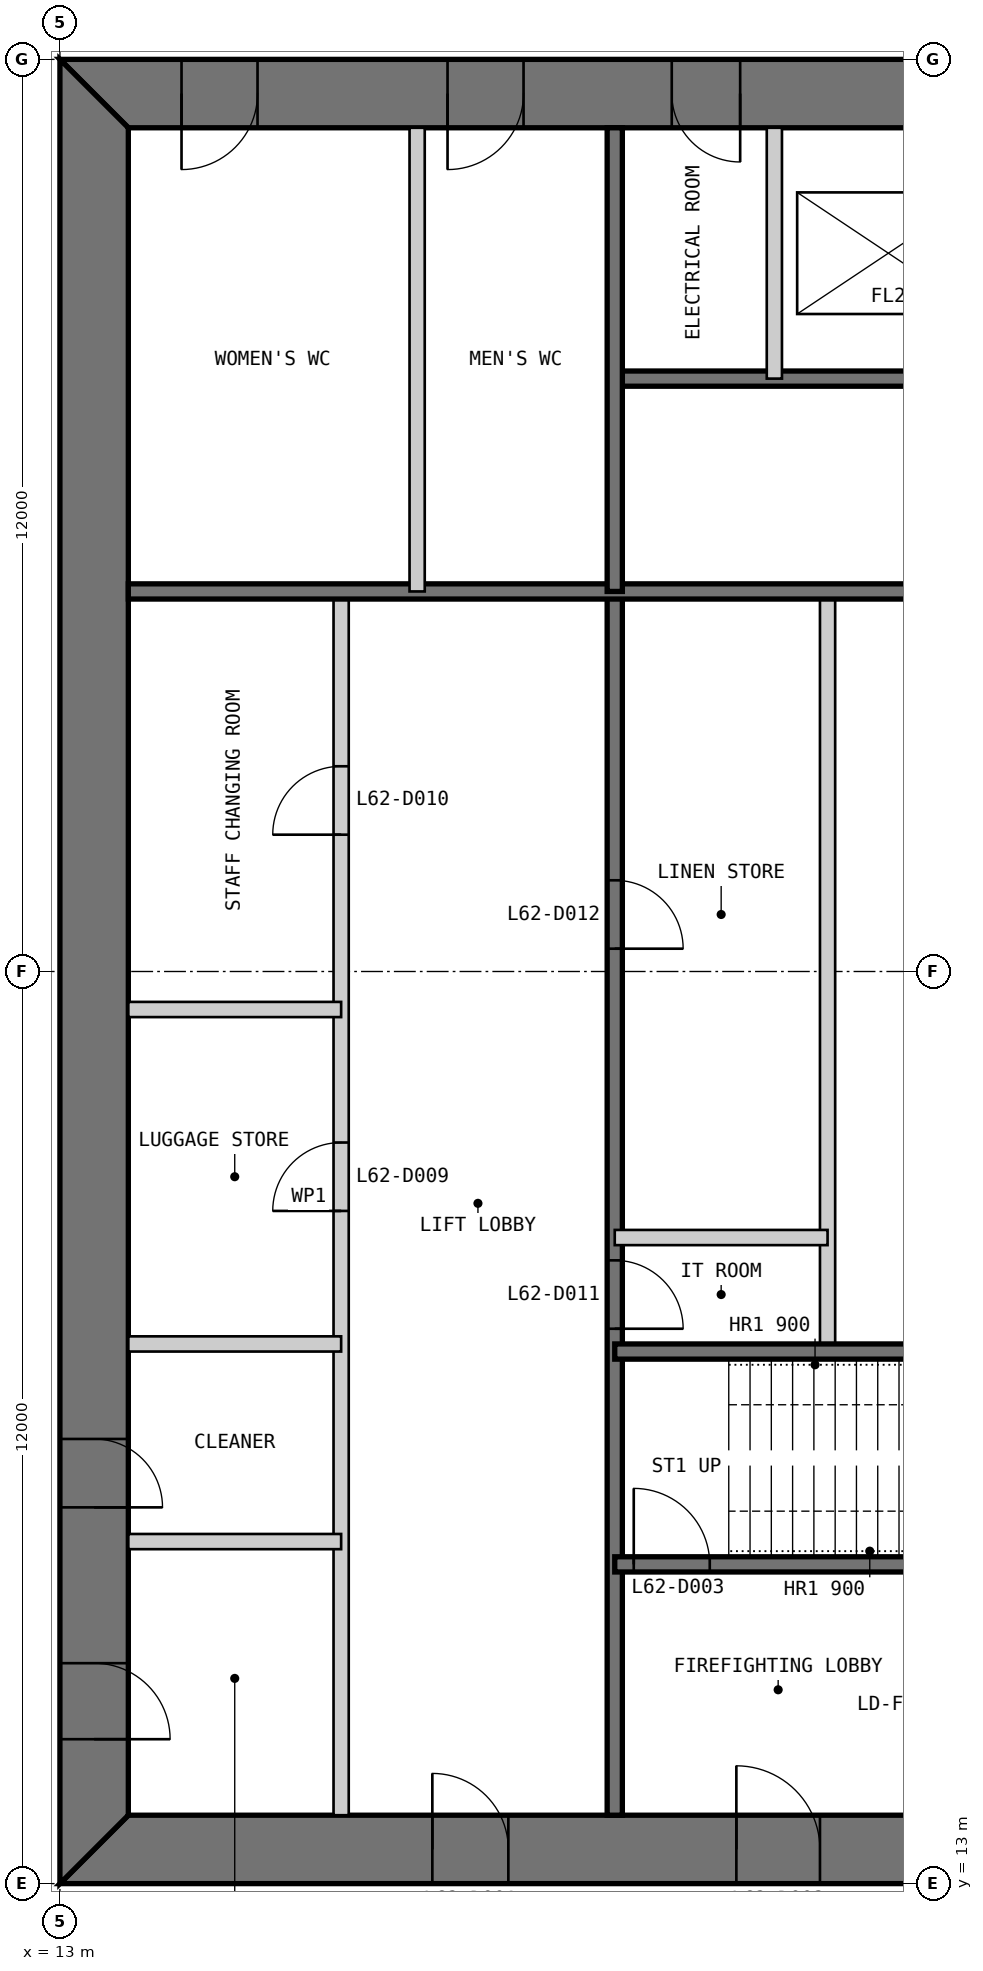
"""IFC4 building model, lengths in metres.
Left out: names, types, materials, properties, quantities, classifications, styles, units other than length and angle.
Written with IfcOpenShell. Run it as: python <this file> out.ifc"""

import sys

from ifc_helpers import new_model, si_unit, direction, frame, frame_2d, origin, place, context, subcontext, project, spatial, polyline, rectangle, outline, extrude, element, fill, save


model = new_model("IFC4")
c1 = context("Model", 3, precision=1e-05, world=origin(), true_north=direction((0.0, 1.0)))
c2 = subcontext(c1, "Body", "Model", "MODEL_VIEW")
j1 = project(units=[si_unit("LENGTHUNIT", "METRE"), si_unit("PLANEANGLEUNIT", "RADIAN")], contexts=[c1])
p1 = place(None, origin())
s1 = spatial("IfcSite", under=j1, at=p1, CompositionType="ELEMENT")
p2 = place(p1, origin())
s2 = spatial("IfcBuilding", under=s1, at=p2, CompositionType="ELEMENT")
p3 = place(p2, frame((0.0, 0.0, 262.8)))
s3 = spatial("IfcBuildingStorey", under=s2, at=p3, CompositionType="ELEMENT", Elevation=262.8)
p4 = place(p3, frame((13.0, 13.45, 0.0), z_axis=(0.0, 0.0, 1.0), x_axis=(1.0, 0.0, 0.0)))
e1 = element("IfcWall", 1, at=p4, inside=s3, PredefinedType="SHEAR", context=c2, shape_type="SweptSolid", body=[
    extrude(outline(polyline([(0.0, -0.45), (24.0, -0.45), (23.1, 0.45), (0.9, 0.45), (0.0, -0.45)])), origin(), (0.0, 0.0, 1.0), 3.4),
])
p5 = place(p4, frame((4.9, 0.0, 0.0)))
e2 = element("IfcOpeningElement", 2, at=p5, cuts=e1, PredefinedType="OPENING", context=c2, shape_type="SweptSolid", body=[
    extrude(rectangle(XDim=1.0, YDim=2.2, at=frame_2d((0.5, 1.1))), frame((0.0, 0.46, 0.0), z_axis=(0.0, -1.0, 0.0), x_axis=(1.0, 0.0, 0.0)), (0.0, 0.0, 1.0), 0.92),
])
p6 = place(p4, frame((8.9, 0.0, 0.0)))
e3 = element("IfcOpeningElement", 3, at=p6, cuts=e1, PredefinedType="OPENING", context=c2, shape_type="SweptSolid", body=[
    extrude(rectangle(XDim=1.1, YDim=2.2, at=frame_2d((0.55, 1.1))), frame((0.0, 0.46, 0.0), z_axis=(0.0, -1.0, 0.0), x_axis=(1.0, 0.0, 0.0)), (0.0, 0.0, 1.0), 0.92),
])
p7 = place(p4, frame((15.05, 0.0, 0.0)))
e4 = element("IfcOpeningElement", 4, at=p7, cuts=e1, PredefinedType="OPENING", context=c2, shape_type="SweptSolid", body=[
    extrude(rectangle(XDim=0.9, YDim=2.2, at=frame_2d((0.45, 1.1))), frame((0.0, 0.46, 0.0), z_axis=(0.0, -1.0, 0.0), x_axis=(1.0, 0.0, 0.0)), (0.0, 0.0, 1.0), 0.92),
])
p8 = place(p4, frame((17.9, 0.0, 0.0)))
e5 = element("IfcOpeningElement", 5, at=p8, cuts=e1, PredefinedType="OPENING", context=c2, shape_type="SweptSolid", body=[
    extrude(rectangle(XDim=1.0, YDim=2.2, at=frame_2d((0.5, 1.1))), frame((0.0, 0.46, 0.0), z_axis=(0.0, -1.0, 0.0), x_axis=(1.0, 0.0, 0.0)), (0.0, 0.0, 1.0), 0.92),
])
p9 = place(p4, frame((21.4, 0.0, 0.0)))
e6 = element("IfcOpeningElement", 6, at=p9, cuts=e1, PredefinedType="OPENING", context=c2, shape_type="SweptSolid", body=[
    extrude(rectangle(XDim=1.0, YDim=2.2, at=frame_2d((0.5, 1.1))), frame((0.0, 0.46, 0.0), z_axis=(0.0, -1.0, 0.0), x_axis=(1.0, 0.0, 0.0)), (0.0, 0.0, 1.0), 0.92),
])
p10 = place(p3, frame((37.0, 36.55, 0.0), z_axis=(0.0, 0.0, 1.0), x_axis=(-1.0, 0.0, 0.0)))
e7 = element("IfcWall", 7, at=p10, inside=s3, PredefinedType="SHEAR", context=c2, shape_type="SweptSolid", body=[
    extrude(outline(polyline([(0.0, -0.45), (24.0, -0.45), (23.1, 0.45), (0.9, 0.45), (0.0, -0.45)])), origin(), (0.0, 0.0, 1.0), 3.4),
])
p11 = place(p10, frame((4.9, 0.0, 0.0)))
e8 = element("IfcOpeningElement", 8, at=p11, cuts=e7, PredefinedType="OPENING", context=c2, shape_type="SweptSolid", body=[
    extrude(rectangle(XDim=1.0, YDim=2.2, at=frame_2d((0.5, 1.1))), frame((0.0, 0.46, 0.0), z_axis=(0.0, -1.0, 0.0), x_axis=(1.0, 0.0, 0.0)), (0.0, 0.0, 1.0), 0.92),
])
p12 = place(p10, frame((8.9, 0.0, 0.0)))
e9 = element("IfcOpeningElement", 9, at=p12, cuts=e7, PredefinedType="OPENING", context=c2, shape_type="SweptSolid", body=[
    extrude(rectangle(XDim=1.1, YDim=2.2, at=frame_2d((0.55, 1.1))), frame((0.0, 0.46, 0.0), z_axis=(0.0, -1.0, 0.0), x_axis=(1.0, 0.0, 0.0)), (0.0, 0.0, 1.0), 0.92),
])
p13 = place(p10, frame((15.05, 0.0, 0.0)))
e10 = element("IfcOpeningElement", 10, at=p13, cuts=e7, PredefinedType="OPENING", context=c2, shape_type="SweptSolid", body=[
    extrude(rectangle(XDim=0.9, YDim=2.2, at=frame_2d((0.45, 1.1))), frame((0.0, 0.46, 0.0), z_axis=(0.0, -1.0, 0.0), x_axis=(1.0, 0.0, 0.0)), (0.0, 0.0, 1.0), 0.92),
])
p14 = place(p10, frame((17.9, 0.0, 0.0)))
e11 = element("IfcOpeningElement", 11, at=p14, cuts=e7, PredefinedType="OPENING", context=c2, shape_type="SweptSolid", body=[
    extrude(rectangle(XDim=1.0, YDim=2.2, at=frame_2d((0.5, 1.1))), frame((0.0, 0.46, 0.0), z_axis=(0.0, -1.0, 0.0), x_axis=(1.0, 0.0, 0.0)), (0.0, 0.0, 1.0), 0.92),
])
p15 = place(p10, frame((21.4, 0.0, 0.0)))
e12 = element("IfcOpeningElement", 12, at=p15, cuts=e7, PredefinedType="OPENING", context=c2, shape_type="SweptSolid", body=[
    extrude(rectangle(XDim=1.0, YDim=2.2, at=frame_2d((0.5, 1.1))), frame((0.0, 0.46, 0.0), z_axis=(0.0, -1.0, 0.0), x_axis=(1.0, 0.0, 0.0)), (0.0, 0.0, 1.0), 0.92),
])
p16 = place(p3, frame((13.45, 36.1, 0.0), z_axis=(0.0, 0.0, 1.0), x_axis=(0.0, -1.0, 0.0)))
e13 = element("IfcWall", 13, at=p16, inside=s3, PredefinedType="SHEAR", context=c2, shape_type="SweptSolid", body=[
    extrude(outline(polyline([(-0.9, -0.45), (23.1, -0.45), (22.2, 0.45), (0.0, 0.45), (-0.9, -0.45)])), origin(), (0.0, 0.0, 1.0), 3.4),
])
p17 = place(p16, frame((20.2, 0.0, 0.0)))
e14 = element("IfcOpeningElement", 14, at=p17, cuts=e13, PredefinedType="OPENING", context=c2, shape_type="SweptSolid", body=[
    extrude(rectangle(XDim=1.0, YDim=2.2, at=frame_2d((0.5, 1.1))), frame((0.0, 0.46, 0.0), z_axis=(0.0, -1.0, 0.0), x_axis=(1.0, 0.0, 0.0)), (0.0, 0.0, 1.0), 0.92),
])
p18 = place(p16, frame((17.25, 0.0, 0.0)))
e15 = element("IfcOpeningElement", 15, at=p18, cuts=e13, PredefinedType="OPENING", context=c2, shape_type="SweptSolid", body=[
    extrude(rectangle(XDim=0.9, YDim=2.2, at=frame_2d((0.45, 1.1))), frame((0.0, 0.46, 0.0), z_axis=(0.0, -1.0, 0.0), x_axis=(1.0, 0.0, 0.0)), (0.0, 0.0, 1.0), 0.92),
])
p19 = place(p3, frame((16.7, 13.9, 0.0), z_axis=(0.0, 0.0, 1.0), x_axis=(0.0, 1.0, 0.0)))
e16 = element("IfcWall", 16, at=p19, inside=s3, PredefinedType="PARTITIONING", context=c2, shape_type="SweptSolid", body=[
    extrude(rectangle(XDim=16.1, YDim=0.2, at=frame_2d((8.05, 0.0))), origin(), (0.0, 0.0, 1.0), 3.2),
])
p20 = place(p19, frame((7.95, 0.0, 0.0)))
e17 = element("IfcOpeningElement", 17, at=p20, cuts=e16, PredefinedType="OPENING", context=c2, shape_type="SweptSolid", body=[
    extrude(rectangle(XDim=0.9, YDim=2.2, at=frame_2d((0.45, 1.1))), frame((0.0, 0.11, 0.0), z_axis=(0.0, -1.0, 0.0), x_axis=(1.0, 0.0, 0.0)), (0.0, 0.0, 1.0), 0.22),
])
p21 = place(p19, frame((12.9, 0.0, 0.0)))
e18 = element("IfcOpeningElement", 18, at=p21, cuts=e16, PredefinedType="OPENING", context=c2, shape_type="SweptSolid", body=[
    extrude(rectangle(XDim=0.9, YDim=2.2, at=frame_2d((0.45, 1.1))), frame((0.0, 0.11, 0.0), z_axis=(0.0, -1.0, 0.0), x_axis=(1.0, 0.0, 0.0)), (0.0, 0.0, 1.0), 0.22),
])
p22 = place(p3, frame((20.3, 13.9, 0.0), z_axis=(0.0, 0.0, 1.0), x_axis=(0.0, 1.0, 0.0)))
e19 = element("IfcWall", 19, at=p22, inside=s3, PredefinedType="SOLIDWALL", context=c2, shape_type="SweptSolid", body=[
    extrude(rectangle(XDim=16.1, YDim=0.2, at=frame_2d((8.05, 0.0))), origin(), (0.0, 0.0, 1.0), 3.2),
])
p23 = place(p22, frame((6.4, 0.0, 0.0)))
e20 = element("IfcOpeningElement", 20, at=p23, cuts=e19, PredefinedType="OPENING", context=c2, shape_type="SweptSolid", body=[
    extrude(rectangle(XDim=0.9, YDim=2.2, at=frame_2d((0.45, 1.1))), frame((0.0, 0.11, 0.0), z_axis=(0.0, -1.0, 0.0), x_axis=(1.0, 0.0, 0.0)), (0.0, 0.0, 1.0), 0.22),
])
p24 = place(p22, frame((11.4, 0.0, 0.0)))
e21 = element("IfcOpeningElement", 21, at=p24, cuts=e19, PredefinedType="OPENING", context=c2, shape_type="SweptSolid", body=[
    extrude(rectangle(XDim=0.9, YDim=2.2, at=frame_2d((0.45, 1.1))), frame((0.0, 0.11, 0.0), z_axis=(0.0, -1.0, 0.0), x_axis=(1.0, 0.0, 0.0)), (0.0, 0.0, 1.0), 0.22),
])
p25 = place(p3, frame((23.1, 20.0, 0.0), z_axis=(0.0, 0.0, 1.0), x_axis=(0.0, 1.0, 0.0)))
e22 = element("IfcWall", 22, at=p25, inside=s3, PredefinedType="PARTITIONING", context=c2, shape_type="SweptSolid", body=[
    extrude(rectangle(XDim=10.0, YDim=0.2, at=frame_2d((5.0, 0.0))), origin(), (0.0, 0.0, 1.0), 3.2),
])
p26 = place(p3, frame((20.3, 17.2, 0.0), z_axis=(0.0, 0.0, 1.0), x_axis=(1.0, 0.0, 0.0)))
e23 = element("IfcWall", 23, at=p26, inside=s3, PredefinedType="SOLIDWALL", context=c2, shape_type="SweptSolid", body=[
    extrude(rectangle(XDim=9.4, YDim=0.2, at=frame_2d((4.7, 0.0))), origin(), (0.0, 0.0, 1.0), 3.2),
])
p27 = place(p26, frame((0.25, 0.0, 0.0)))
e24 = element("IfcOpeningElement", 24, at=p27, cuts=e23, PredefinedType="OPENING", context=c2, shape_type="SweptSolid", body=[
    extrude(rectangle(XDim=1.0, YDim=2.2, at=frame_2d((0.5, 1.1))), frame((0.0, 0.11, 0.0), z_axis=(0.0, -1.0, 0.0), x_axis=(1.0, 0.0, 0.0)), (0.0, 0.0, 1.0), 0.22),
])
p28 = place(p3, frame((20.3, 20.0, 0.0), z_axis=(0.0, 0.0, 1.0), x_axis=(1.0, 0.0, 0.0)))
e25 = element("IfcWall", 25, at=p28, inside=s3, PredefinedType="SOLIDWALL", context=c2, shape_type="SweptSolid", body=[
    extrude(rectangle(XDim=15.8, YDim=0.2, at=frame_2d((7.9, 0.0))), origin(), (0.0, 0.0, 1.0), 3.2),
])
for number, where, z_axis, x_axis in (
    (26, (13.9, 17.5, 0.0), (0.0, 0.0, 1.0), (1.0, 0.0, 0.0)),
    (27, (13.9, 20.1, 0.0), (0.0, 0.0, 1.0), (1.0, 0.0, 0.0)),
    (28, (13.9, 24.5, 0.0), (0.0, 0.0, 1.0), (1.0, 0.0, 0.0)),
    (29, (20.3, 21.5, 0.0), (0.0, 0.0, 1.0), (1.0, 0.0, 0.0)),
):
    element("IfcWall", number, at=place(p3, frame(where, z_axis=z_axis, x_axis=x_axis)), inside=s3, PredefinedType="PARTITIONING", context=c2, shape_type="SweptSolid", body=[
        extrude(rectangle(XDim=2.8, YDim=0.2, at=frame_2d((1.4, 0.0))), origin(), (0.0, 0.0, 1.0), 3.2),
    ])
p29 = place(p3, frame((29.7, 32.8, 0.0), z_axis=(0.0, 0.0, 1.0), x_axis=(-1.0, 0.0, 0.0)))
e30 = element("IfcWall", 30, at=p29, inside=s3, PredefinedType="SOLIDWALL", context=c2, shape_type="SweptSolid", body=[
    extrude(rectangle(XDim=9.4, YDim=0.2, at=frame_2d((4.7, 0.0))), origin(), (0.0, 0.0, 1.0), 3.2),
])
p30 = place(p29, frame((0.25, 0.0, 0.0)))
e31 = element("IfcOpeningElement", 31, at=p30, cuts=e30, PredefinedType="OPENING", context=c2, shape_type="SweptSolid", body=[
    extrude(rectangle(XDim=1.0, YDim=2.2, at=frame_2d((0.5, 1.1))), frame((0.0, 0.11, 0.0), z_axis=(0.0, -1.0, 0.0), x_axis=(1.0, 0.0, 0.0)), (0.0, 0.0, 1.0), 0.22),
])
p31 = place(p3, frame((29.7, 30.0, 0.0), z_axis=(0.0, 0.0, 1.0), x_axis=(-1.0, 0.0, 0.0)))
e32 = element("IfcWall", 32, at=p31, inside=s3, PredefinedType="SOLIDWALL", context=c2, shape_type="SweptSolid", body=[
    extrude(rectangle(XDim=15.8, YDim=0.2, at=frame_2d((7.9, 0.0))), origin(), (0.0, 0.0, 1.0), 3.2),
])
p32 = place(p3, frame((22.4, 36.1, 0.0), z_axis=(0.0, 0.0, 1.0), x_axis=(0.0, -1.0, 0.0)))
e33 = element("IfcWall", 33, at=p32, inside=s3, PredefinedType="PARTITIONING", context=c2, shape_type="SweptSolid", body=[
    extrude(rectangle(XDim=3.3, YDim=0.2, at=frame_2d((1.65, 0.0))), origin(), (0.0, 0.0, 1.0), 3.2),
])
p33 = place(p3, frame((20.3, 36.1, 0.0), z_axis=(0.0, 0.0, 1.0), x_axis=(0.0, -1.0, 0.0)))
e34 = element("IfcWall", 34, at=p33, inside=s3, PredefinedType="SOLIDWALL", context=c2, shape_type="SweptSolid", body=[
    extrude(rectangle(XDim=6.1, YDim=0.2, at=frame_2d((3.05, 0.0))), origin(), (0.0, 0.0, 1.0), 3.2),
])
p34 = place(p3, frame((17.7, 36.1, 0.0), z_axis=(0.0, 0.0, 1.0), x_axis=(0.0, -1.0, 0.0)))
e35 = element("IfcWall", 35, at=p34, inside=s3, PredefinedType="PARTITIONING", context=c2, shape_type="SweptSolid", body=[
    extrude(rectangle(XDim=6.1, YDim=0.2, at=frame_2d((3.05, 0.0))), origin(), (0.0, 0.0, 1.0), 3.2),
])
p35 = place(p5, origin())
e36 = element("IfcDoor", 36, at=p35, inside=s3, OperationType="SINGLE_SWING_LEFT", PredefinedType="DOOR", context=c2, shape_type="SweptSolid", body=[
    extrude(rectangle(XDim=1.0, YDim=2.2, at=frame_2d((0.5, 1.1))), frame((0.0, 0.025, 0.0), z_axis=(0.0, -1.0, 0.0), x_axis=(1.0, 0.0, 0.0)), (0.0, 0.0, 1.0), 0.05),
    extrude(outline(polyline([(0.0, 0.0), (0.04, 0.0), (0.04, 2.16), (0.96, 2.16), (0.96, 0.0), (1.0, 0.0), (1.0, 2.2), (0.0, 2.2), (0.0, 0.0)])), frame((0.0, 0.3, 0.0), z_axis=(0.0, -1.0, 0.0), x_axis=(1.0, 0.0, 0.0)), (0.0, 0.0, 1.0), 0.6),
])
fill(e2, e36)
p36 = place(p6, origin())
e37 = element("IfcDoor", 37, at=p36, inside=s3, OperationType="SINGLE_SWING_LEFT", PredefinedType="DOOR", context=c2, shape_type="SweptSolid", body=[
    extrude(rectangle(XDim=1.1, YDim=2.2, at=frame_2d((0.55, 1.1))), frame((0.0, 0.025, 0.0), z_axis=(0.0, -1.0, 0.0), x_axis=(1.0, 0.0, 0.0)), (0.0, 0.0, 1.0), 0.05),
    extrude(outline(polyline([(0.0, 0.0), (0.04, 0.0), (0.04, 2.16), (1.06, 2.16), (1.06, 0.0), (1.1, 0.0), (1.1, 2.2), (0.0, 2.2), (0.0, 0.0)])), frame((0.0, 0.3, 0.0), z_axis=(0.0, -1.0, 0.0), x_axis=(1.0, 0.0, 0.0)), (0.0, 0.0, 1.0), 0.6),
])
fill(e3, e37)
p37 = place(p27, origin())
e38 = element("IfcDoor", 38, at=p37, inside=s3, OperationType="SINGLE_SWING_LEFT", PredefinedType="DOOR", context=c2, shape_type="SweptSolid", body=[
    extrude(rectangle(XDim=1.0, YDim=2.2, at=frame_2d((0.5, 1.1))), frame((0.0, 0.025, 0.0), z_axis=(0.0, -1.0, 0.0), x_axis=(1.0, 0.0, 0.0)), (0.0, 0.0, 1.0), 0.05),
])
fill(e24, e38)
p38 = place(p17, origin())
e39 = element("IfcDoor", 39, at=p38, inside=s3, OperationType="SINGLE_SWING_RIGHT", PredefinedType="DOOR", context=c2, shape_type="SweptSolid", body=[
    extrude(rectangle(XDim=1.0, YDim=2.2, at=frame_2d((0.5, 1.1))), frame((0.0, 0.025, 0.0), z_axis=(0.0, -1.0, 0.0), x_axis=(1.0, 0.0, 0.0)), (0.0, 0.0, 1.0), 0.05),
    extrude(outline(polyline([(0.0, 0.0), (0.04, 0.0), (0.04, 2.16), (0.96, 2.16), (0.96, 0.0), (1.0, 0.0), (1.0, 2.2), (0.0, 2.2), (0.0, 0.0)])), frame((0.0, 0.3, 0.0), z_axis=(0.0, -1.0, 0.0), x_axis=(1.0, 0.0, 0.0)), (0.0, 0.0, 1.0), 0.6),
])
fill(e14, e39)
p39 = place(p18, origin())
e40 = element("IfcDoor", 40, at=p39, inside=s3, OperationType="SINGLE_SWING_RIGHT", PredefinedType="DOOR", context=c2, shape_type="SweptSolid", body=[
    extrude(rectangle(XDim=0.9, YDim=2.2, at=frame_2d((0.45, 1.1))), frame((0.0, 0.025, 0.0), z_axis=(0.0, -1.0, 0.0), x_axis=(1.0, 0.0, 0.0)), (0.0, 0.0, 1.0), 0.05),
    extrude(outline(polyline([(0.0, 0.0), (0.04, 0.0), (0.04, 2.16), (0.86, 2.16), (0.86, 0.0), (0.9, 0.0), (0.9, 2.2), (0.0, 2.2), (0.0, 0.0)])), frame((0.0, 0.3, 0.0), z_axis=(0.0, -1.0, 0.0), x_axis=(1.0, 0.0, 0.0)), (0.0, 0.0, 1.0), 0.6),
])
fill(e15, e40)
p40 = place(p20, origin())
e41 = element("IfcDoor", 41, at=p40, inside=s3, OperationType="SINGLE_SWING_LEFT", PredefinedType="DOOR", context=c2, shape_type="SweptSolid", body=[
    extrude(rectangle(XDim=0.9, YDim=2.2, at=frame_2d((0.45, 1.1))), frame((0.0, 0.025, 0.0), z_axis=(0.0, -1.0, 0.0), x_axis=(1.0, 0.0, 0.0)), (0.0, 0.0, 1.0), 0.05),
])
fill(e17, e41)
p41 = place(p21, origin())
e42 = element("IfcDoor", 42, at=p41, inside=s3, OperationType="SINGLE_SWING_LEFT", PredefinedType="DOOR", context=c2, shape_type="SweptSolid", body=[
    extrude(rectangle(XDim=0.9, YDim=2.2, at=frame_2d((0.45, 1.1))), frame((0.0, 0.025, 0.0), z_axis=(0.0, -1.0, 0.0), x_axis=(1.0, 0.0, 0.0)), (0.0, 0.0, 1.0), 0.05),
])
fill(e18, e42)
p42 = place(p23, frame((0.9, 0.0, 0.0), z_axis=(0.0, 0.0, 1.0), x_axis=(-1.0, 0.0, 0.0)))
e43 = element("IfcDoor", 43, at=p42, inside=s3, OperationType="SINGLE_SWING_RIGHT", PredefinedType="DOOR", context=c2, shape_type="SweptSolid", body=[
    extrude(rectangle(XDim=0.9, YDim=2.2, at=frame_2d((0.45, 1.1))), frame((0.0, 0.025, 0.0), z_axis=(0.0, -1.0, 0.0), x_axis=(1.0, 0.0, 0.0)), (0.0, 0.0, 1.0), 0.05),
])
fill(e20, e43)
p43 = place(p24, frame((0.9, 0.0, 0.0), z_axis=(0.0, 0.0, 1.0), x_axis=(-1.0, 0.0, 0.0)))
e44 = element("IfcDoor", 44, at=p43, inside=s3, OperationType="SINGLE_SWING_RIGHT", PredefinedType="DOOR", context=c2, shape_type="SweptSolid", body=[
    extrude(rectangle(XDim=0.9, YDim=2.2, at=frame_2d((0.45, 1.1))), frame((0.0, 0.025, 0.0), z_axis=(0.0, -1.0, 0.0), x_axis=(1.0, 0.0, 0.0)), (0.0, 0.0, 1.0), 0.05),
])
fill(e21, e44)
p44 = place(p13, origin())
e45 = element("IfcDoor", 45, at=p44, inside=s3, OperationType="SINGLE_SWING_LEFT", PredefinedType="DOOR", context=c2, shape_type="SweptSolid", body=[
    extrude(rectangle(XDim=0.9, YDim=2.2, at=frame_2d((0.45, 1.1))), frame((0.0, 0.025, 0.0), z_axis=(0.0, -1.0, 0.0), x_axis=(1.0, 0.0, 0.0)), (0.0, 0.0, 1.0), 0.05),
    extrude(outline(polyline([(0.0, 0.0), (0.04, 0.0), (0.04, 2.16), (0.86, 2.16), (0.86, 0.0), (0.9, 0.0), (0.9, 2.2), (0.0, 2.2), (0.0, 0.0)])), frame((0.0, 0.3, 0.0), z_axis=(0.0, -1.0, 0.0), x_axis=(1.0, 0.0, 0.0)), (0.0, 0.0, 1.0), 0.6),
])
fill(e10, e45)
p45 = place(p14, origin())
e46 = element("IfcDoor", 46, at=p45, inside=s3, OperationType="SINGLE_SWING_RIGHT", PredefinedType="DOOR", context=c2, shape_type="SweptSolid", body=[
    extrude(rectangle(XDim=1.0, YDim=2.2, at=frame_2d((0.5, 1.1))), frame((0.0, 0.025, 0.0), z_axis=(0.0, -1.0, 0.0), x_axis=(1.0, 0.0, 0.0)), (0.0, 0.0, 1.0), 0.05),
    extrude(outline(polyline([(0.0, 0.0), (0.04, 0.0), (0.04, 2.16), (0.96, 2.16), (0.96, 0.0), (1.0, 0.0), (1.0, 2.2), (0.0, 2.2), (0.0, 0.0)])), frame((0.0, 0.3, 0.0), z_axis=(0.0, -1.0, 0.0), x_axis=(1.0, 0.0, 0.0)), (0.0, 0.0, 1.0), 0.6),
])
fill(e11, e46)
p46 = place(p15, origin())
e47 = element("IfcDoor", 47, at=p46, inside=s3, OperationType="SINGLE_SWING_RIGHT", PredefinedType="DOOR", context=c2, shape_type="SweptSolid", body=[
    extrude(rectangle(XDim=1.0, YDim=2.2, at=frame_2d((0.5, 1.1))), frame((0.0, 0.025, 0.0), z_axis=(0.0, -1.0, 0.0), x_axis=(1.0, 0.0, 0.0)), (0.0, 0.0, 1.0), 0.05),
    extrude(outline(polyline([(0.0, 0.0), (0.04, 0.0), (0.04, 2.16), (0.96, 2.16), (0.96, 0.0), (1.0, 0.0), (1.0, 2.2), (0.0, 2.2), (0.0, 0.0)])), frame((0.0, 0.3, 0.0), z_axis=(0.0, -1.0, 0.0), x_axis=(1.0, 0.0, 0.0)), (0.0, 0.0, 1.0), 0.6),
])
fill(e12, e47)
save(model, sys.argv[1])
